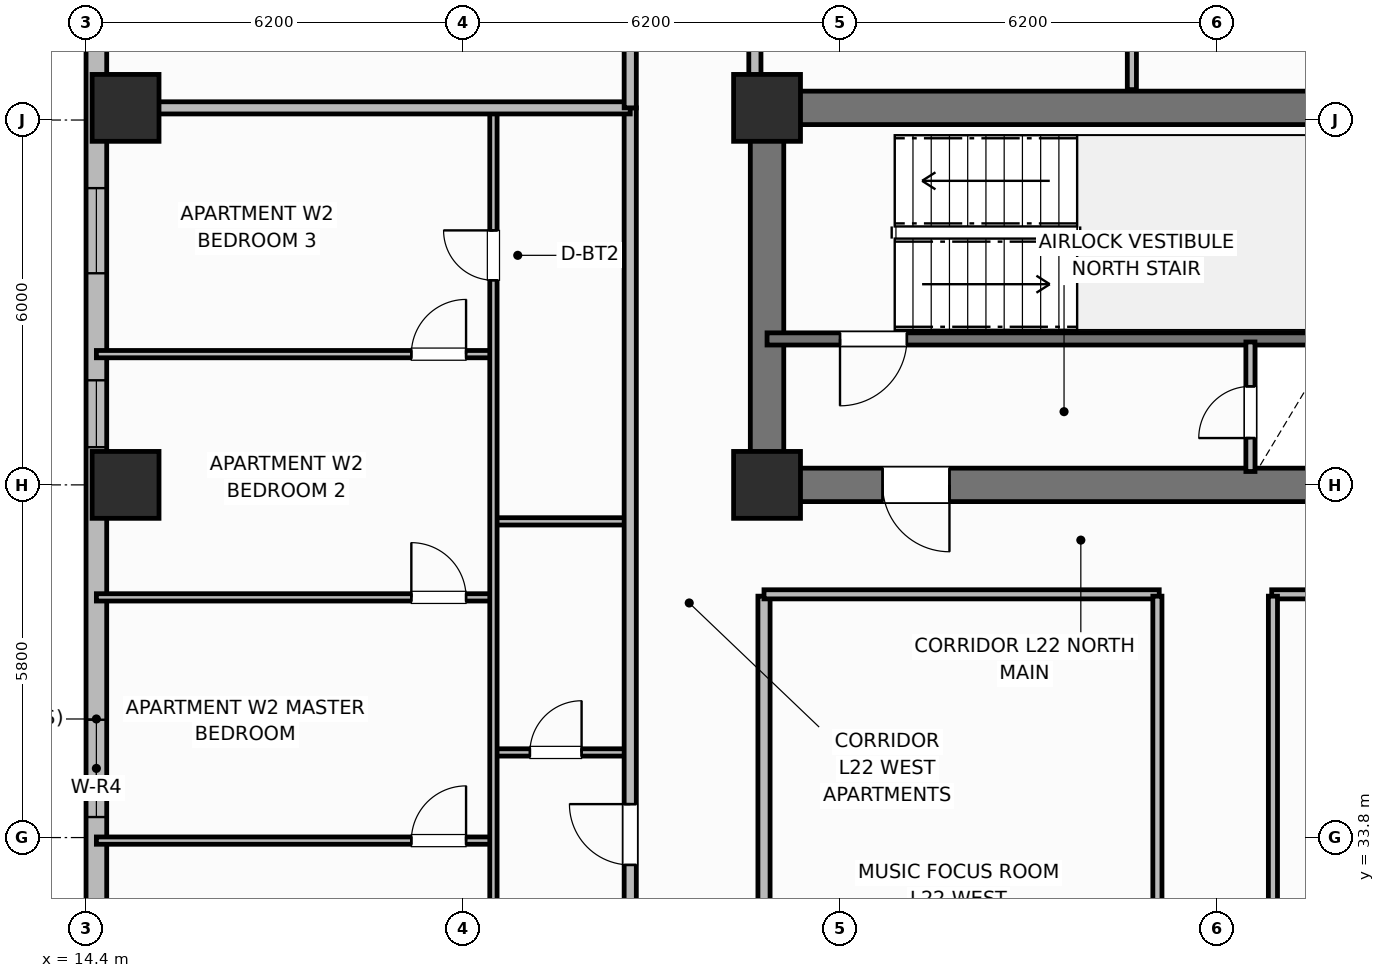
"""IFC4 building model, lengths in metres.
Left out: names, types, materials, properties, quantities, classifications, styles, units other than length and angle.
Written with IfcOpenShell. Run it as: python <this file> out.ifc"""

import sys

from ifc_helpers import new_model, si_unit, direction, frame, frame_2d, origin, origin_2d, place, context, subcontext, project, spatial, rectangle, extrude, element, fill, save


model = new_model("IFC4")
c1 = context("Model", 3, precision=1e-05, world=origin(), true_north=direction((0.0, 1.0)))
c2 = subcontext(c1, "Body", "Model", "MODEL_VIEW")
j1 = project(units=[si_unit("LENGTHUNIT", "METRE"), si_unit("PLANEANGLEUNIT", "RADIAN")], contexts=[c1])
p1 = place(None, origin())
s1 = spatial("IfcSite", under=j1, at=p1, CompositionType="ELEMENT")
p2 = place(p1, origin())
s2 = spatial("IfcBuilding", under=s1, at=p2, CompositionType="ELEMENT")
p3 = place(p2, frame((0.0, 0.0, 92.0)))
s3 = spatial("IfcBuildingStorey", under=s2, at=p3, CompositionType="ELEMENT", Elevation=92.0)
p4 = place(p3, frame((25.6, 45.8, 0.0), z_axis=(0.0, 0.0, 1.0), x_axis=(1.0, 0.0, 0.0)))
e1 = element("IfcWall", 1, at=p4, inside=s3, PredefinedType="SHEAR", context=c2, shape_type="SweptSolid", body=[
    extrude(rectangle(XDim=27.2, YDim=0.55, at=frame_2d((13.6, 0.0))), origin(), (0.0, 0.0, 1.0), 3.7),
])
p5 = place(p3, frame((25.6, 39.875, 0.0), z_axis=(0.0, 0.0, 1.0), x_axis=(0.0, 1.0, 0.0)))
e2 = element("IfcWall", 2, at=p5, inside=s3, PredefinedType="SHEAR", context=c2, shape_type="SweptSolid", body=[
    extrude(rectangle(XDim=5.65, YDim=0.55, at=frame_2d((2.825, 0.0))), origin(), (0.0, 0.0, 1.0), 3.7),
])
p6 = place(p3, frame((52.8, 39.6, 0.0), z_axis=(0.0, 0.0, 1.0), x_axis=(-1.0, 0.0, 0.0)))
e3 = element("IfcWall", 3, at=p6, inside=s3, PredefinedType="SHEAR", context=c2, shape_type="SweptSolid", body=[
    extrude(rectangle(XDim=27.2, YDim=0.55, at=frame_2d((13.6, 0.0))), origin(), (0.0, 0.0, 1.0), 3.7),
])
p7 = place(p6, frame((24.2, 0.0, 0.0)))
e4 = element("IfcOpeningElement", 4, at=p7, cuts=e3, PredefinedType="OPENING", context=c2, shape_type="SweptSolid", body=[
    extrude(rectangle(XDim=1.1, YDim=2.15, at=frame_2d((0.55, 1.075))), frame((0.0, 0.285, 0.0), z_axis=(0.0, -1.0, 0.0), x_axis=(1.0, 0.0, 0.0)), (0.0, 0.0, 1.0), 0.57),
])
p8 = place(p6, frame((15.1, 0.0, 0.0)))
e5 = element("IfcOpeningElement", 5, at=p8, cuts=e3, PredefinedType="OPENING", context=c2, shape_type="SweptSolid", body=[
    extrude(rectangle(XDim=1.2, YDim=2.15, at=frame_2d((0.6, 1.075))), frame((0.0, 0.285, 0.0), z_axis=(0.0, -1.0, 0.0), x_axis=(1.0, 0.0, 0.0)), (0.0, 0.0, 1.0), 0.57),
])
p9 = place(p6, frame((11.3, 0.0, 0.0)))
e6 = element("IfcOpeningElement", 6, at=p9, cuts=e3, PredefinedType="OPENING", context=c2, shape_type="SweptSolid", body=[
    extrude(rectangle(XDim=1.3, YDim=2.2, at=frame_2d((0.65, 1.1))), frame((0.0, 0.285, 0.0), z_axis=(0.0, -1.0, 0.0), x_axis=(1.0, 0.0, 0.0)), (0.0, 0.0, 1.0), 0.57),
])
p10 = place(p6, frame((7.25, 0.0, 0.0)))
e7 = element("IfcOpeningElement", 7, at=p10, cuts=e3, PredefinedType="OPENING", context=c2, shape_type="SweptSolid", body=[
    extrude(rectangle(XDim=0.85, YDim=2.1, at=frame_2d((0.425, 1.05))), frame((0.0, 0.285, 0.0), z_axis=(0.0, -1.0, 0.0), x_axis=(1.0, 0.0, 0.0)), (0.0, 0.0, 1.0), 0.57),
])
p11 = place(p6, frame((3.0, 0.0, 0.0)))
e8 = element("IfcOpeningElement", 8, at=p11, cuts=e3, PredefinedType="OPENING", context=c2, shape_type="SweptSolid", body=[
    extrude(rectangle(XDim=0.9, YDim=2.1, at=frame_2d((0.45, 1.05))), frame((0.0, 0.285, 0.0), z_axis=(0.0, -1.0, 0.0), x_axis=(1.0, 0.0, 0.0)), (0.0, 0.0, 1.0), 0.57),
])
for number, where, z_axis, x_axis in (
    (9, (25.6, 39.6, 0.0), (0.0, 0.0, 1.0), (1.0, 0.0, 0.0)),
    (10, (25.6, 45.8, 0.0), (0.0, 0.0, 1.0), (1.0, 0.0, 0.0)),
    (11, (15.05, 39.6, 0.0), (0.0, 0.0, 1.0), (1.0, 0.0, 0.0)),
    (12, (15.05, 45.8, 0.0), (0.0, 0.0, 1.0), (1.0, 0.0, 0.0)),
):
    element("IfcColumn", number, at=place(p3, frame(where, z_axis=z_axis, x_axis=x_axis)), inside=s3, PredefinedType="COLUMN", context=c2, shape_type="SweptSolid", body=[
        extrude(rectangle(XDim=1.1, YDim=1.1, at=origin_2d()), origin(), (0.0, 0.0, 1.0), 3.7),
    ])
p12 = place(p3, frame((14.57, 47.4, 0.0), z_axis=(0.0, 0.0, 1.0), x_axis=(0.0, -1.0, 0.0)))
e13 = element("IfcWall", 13, at=p12, inside=s3, PredefinedType="SOLIDWALL", context=c2, shape_type="SweptSolid", body=[
    extrude(rectangle(XDim=14.8, YDim=0.34, at=frame_2d((7.4, 0.0))), origin(), (0.0, 0.0, 1.0), 2.7),
])
p13 = place(p12, frame((2.92, 0.0, 0.69)))
e14 = element("IfcOpeningElement", 14, at=p13, cuts=e13, PredefinedType="OPENING", context=c2, shape_type="SweptSolid", body=[
    extrude(rectangle(XDim=1.4, YDim=1.85, at=frame_2d((0.7, 0.925))), frame((0.0, 0.18, 0.0), z_axis=(0.0, -1.0, 0.0), x_axis=(1.0, 0.0, 0.0)), (0.0, 0.0, 1.0), 0.36),
])
p14 = place(p12, frame((6.08, 0.0, 0.89)))
e15 = element("IfcOpeningElement", 15, at=p14, cuts=e13, PredefinedType="OPENING", context=c2, shape_type="SweptSolid", body=[
    extrude(rectangle(XDim=1.1, YDim=1.65, at=frame_2d((0.55, 0.825))), frame((0.0, 0.18, 0.0), z_axis=(0.0, -1.0, 0.0), x_axis=(1.0, 0.0, 0.0)), (0.0, 0.0, 1.0), 0.36),
])
p15 = place(p12, frame((11.663, 0.0, 0.68)))
e16 = element("IfcOpeningElement", 16, at=p15, cuts=e13, PredefinedType="OPENING", context=c2, shape_type="SweptSolid", body=[
    extrude(rectangle(XDim=1.6, YDim=1.9, at=frame_2d((0.8, 0.95))), frame((0.0, 0.18, 0.0), z_axis=(0.0, -1.0, 0.0), x_axis=(1.0, 0.0, 0.0)), (0.0, 0.0, 1.0), 0.36),
])
p16 = place(p3, frame((35.15, 42.0, 0.0), z_axis=(0.0, 0.0, 1.0), x_axis=(-1.0, 0.0, 0.0)))
e17 = element("IfcWall", 17, at=p16, inside=s3, PredefinedType="SHEAR", context=c2, shape_type="SweptSolid", body=[
    extrude(rectangle(XDim=9.55, YDim=0.2, at=frame_2d((4.775, 0.0))), origin(), (0.0, 0.0, 1.0), 3.7),
])
p17 = place(p16, frame((7.25, 0.0, 0.0)))
e18 = element("IfcOpeningElement", 18, at=p17, cuts=e17, PredefinedType="OPENING", context=c2, shape_type="SweptSolid", body=[
    extrude(rectangle(XDim=1.1, YDim=2.15, at=frame_2d((0.55, 1.075))), frame((0.0, 0.11, 0.0), z_axis=(0.0, -1.0, 0.0), x_axis=(1.0, 0.0, 0.0)), (0.0, 0.0, 1.0), 0.22),
])
p18 = place(p3, frame((33.55, 39.82, 0.0), z_axis=(0.0, 0.0, 1.0), x_axis=(0.0, 1.0, 0.0)))
e19 = element("IfcWall", 19, at=p18, inside=s3, PredefinedType="PARTITIONING", context=c2, shape_type="SweptSolid", body=[
    extrude(rectangle(XDim=2.13, YDim=0.15, at=frame_2d((1.065, 0.0))), origin(), (0.0, 0.0, 1.0), 2.53),
])
p19 = place(p18, frame((0.55, 0.0, 0.0)))
e20 = element("IfcOpeningElement", 20, at=p19, cuts=e19, PredefinedType="OPENING", context=c2, shape_type="SweptSolid", body=[
    extrude(rectangle(XDim=0.85, YDim=2.05, at=frame_2d((0.425, 1.025))), frame((0.0, 0.085, 0.0), z_axis=(0.0, -1.0, 0.0), x_axis=(1.0, 0.0, 0.0)), (0.0, 0.0, 1.0), 0.17),
])
p20 = place(p3, frame((25.55, 18.63, 0.0), z_axis=(0.0, 0.0, 1.0), x_axis=(0.0, 1.0, 0.0)))
e21 = element("IfcWall", 21, at=p20, inside=s3, PredefinedType="PARTITIONING", context=c2, shape_type="SweptSolid", body=[
    extrude(rectangle(XDim=19.14, YDim=0.2, at=frame_2d((9.57, 0.0))), origin(), (0.0, 0.0, 1.0), 2.53),
])
p21 = place(p3, frame((25.55, 37.8, 0.0), z_axis=(0.0, 0.0, 1.0), x_axis=(1.0, 0.0, 0.0)))
e22 = element("IfcWall", 22, at=p21, inside=s3, PredefinedType="PARTITIONING", context=c2, shape_type="SweptSolid", body=[
    extrude(rectangle(XDim=6.5, YDim=0.15, at=frame_2d((3.25, 0.0))), origin(), (0.0, 0.0, 1.0), 2.53),
])
p22 = place(p3, frame((33.9, 37.8, 0.0), z_axis=(0.0, 0.0, 1.0), x_axis=(1.0, 0.0, 0.0)))
e23 = element("IfcWall", 23, at=p22, inside=s3, PredefinedType="PARTITIONING", context=c2, shape_type="SweptSolid", body=[
    extrude(rectangle(XDim=10.6, YDim=0.15, at=frame_2d((5.3, 0.0))), origin(), (0.0, 0.0, 1.0), 2.53),
])
p23 = place(p3, frame((32.02, 18.63, 0.0), z_axis=(0.0, 0.0, 1.0), x_axis=(0.0, 1.0, 0.0)))
e24 = element("IfcWall", 24, at=p23, inside=s3, PredefinedType="PARTITIONING", context=c2, shape_type="SweptSolid", body=[
    extrude(rectangle(XDim=19.14, YDim=0.15, at=frame_2d((9.57, 0.0))), origin(), (0.0, 0.0, 1.0), 2.53),
])
p24 = place(p23, frame((3.0, 0.0, 0.0)))
e25 = element("IfcOpeningElement", 25, at=p24, cuts=e24, PredefinedType="OPENING", context=c2, shape_type="SweptSolid", body=[
    extrude(rectangle(XDim=0.9, YDim=2.1, at=frame_2d((0.45, 1.05))), frame((0.0, 0.085, 0.0), z_axis=(0.0, -1.0, 0.0), x_axis=(1.0, 0.0, 0.0)), (0.0, 0.0, 1.0), 0.17),
])
p25 = place(p23, frame((11.5, 0.0, 0.0)))
e26 = element("IfcOpeningElement", 26, at=p25, cuts=e24, PredefinedType="OPENING", context=c2, shape_type="SweptSolid", body=[
    extrude(rectangle(XDim=0.9, YDim=2.1, at=frame_2d((0.45, 1.05))), frame((0.0, 0.085, 0.0), z_axis=(0.0, -1.0, 0.0), x_axis=(1.0, 0.0, 0.0)), (0.0, 0.0, 1.0), 0.17),
])
p26 = place(p3, frame((33.92, 18.63, 0.0), z_axis=(0.0, 0.0, 1.0), x_axis=(0.0, 1.0, 0.0)))
e27 = element("IfcWall", 27, at=p26, inside=s3, PredefinedType="PARTITIONING", context=c2, shape_type="SweptSolid", body=[
    extrude(rectangle(XDim=19.14, YDim=0.15, at=frame_2d((9.57, 0.0))), origin(), (0.0, 0.0, 1.0), 2.53),
])
p27 = place(p26, frame((2.4, 0.0, 0.0)))
e28 = element("IfcOpeningElement", 28, at=p27, cuts=e27, PredefinedType="OPENING", context=c2, shape_type="SweptSolid", body=[
    extrude(rectangle(XDim=0.9, YDim=2.1, at=frame_2d((0.45, 1.05))), frame((0.0, 0.085, 0.0), z_axis=(0.0, -1.0, 0.0), x_axis=(1.0, 0.0, 0.0)), (0.0, 0.0, 1.0), 0.17),
])
p28 = place(p3, frame((21.1, 35.2, 0.0), z_axis=(0.0, 0.0, 1.0), x_axis=(1.0, 0.0, 0.0)))
e29 = element("IfcWall", 29, at=p28, inside=s3, PredefinedType="PARTITIONING", context=c2, shape_type="SweptSolid", body=[
    extrude(rectangle(XDim=2.25, YDim=0.12, at=frame_2d((1.125, 0.0))), origin(), (0.0, 0.0, 1.0), 2.53),
])
p29 = place(p28, frame((0.6, 0.0, 0.0)))
e30 = element("IfcOpeningElement", 30, at=p29, cuts=e29, PredefinedType="OPENING", context=c2, shape_type="SweptSolid", body=[
    extrude(rectangle(XDim=0.85, YDim=2.1, at=frame_2d((0.425, 1.05))), frame((0.0, 0.07, 0.0), z_axis=(0.0, -1.0, 0.0), x_axis=(1.0, 0.0, 0.0)), (0.0, 0.0, 1.0), 0.14),
])
p30 = place(p3, frame((21.1, 39.0, 0.0), z_axis=(0.0, 0.0, 1.0), x_axis=(1.0, 0.0, 0.0)))
e31 = element("IfcWall", 31, at=p30, inside=s3, PredefinedType="PARTITIONING", context=c2, shape_type="SweptSolid", body=[
    extrude(rectangle(XDim=2.25, YDim=0.12, at=frame_2d((1.125, 0.0))), origin(), (0.0, 0.0, 1.0), 2.53),
])
p31 = place(p3, frame((14.57, 33.75, 0.0), z_axis=(0.0, 0.0, 1.0), x_axis=(1.0, 0.0, 0.0)))
e32 = element("IfcWall", 32, at=p31, inside=s3, PredefinedType="PARTITIONING", context=c2, shape_type="SweptSolid", body=[
    extrude(rectangle(XDim=6.53, YDim=0.12, at=frame_2d((3.265, 0.0))), origin(), (0.0, 0.0, 1.0), 2.53),
])
p32 = place(p31, frame((5.18, 0.0, 0.0)))
e33 = element("IfcOpeningElement", 33, at=p32, cuts=e32, PredefinedType="OPENING", context=c2, shape_type="SweptSolid", body=[
    extrude(rectangle(XDim=0.9, YDim=2.1, at=frame_2d((0.45, 1.05))), frame((0.0, 0.07, 0.0), z_axis=(0.0, -1.0, 0.0), x_axis=(1.0, 0.0, 0.0)), (0.0, 0.0, 1.0), 0.14),
])
p33 = place(p3, frame((14.57, 37.75, 0.0), z_axis=(0.0, 0.0, 1.0), x_axis=(1.0, 0.0, 0.0)))
e34 = element("IfcWall", 34, at=p33, inside=s3, PredefinedType="PARTITIONING", context=c2, shape_type="SweptSolid", body=[
    extrude(rectangle(XDim=6.53, YDim=0.12, at=frame_2d((3.265, 0.0))), origin(), (0.0, 0.0, 1.0), 2.53),
])
p34 = place(p33, frame((5.18, 0.0, 0.0)))
e35 = element("IfcOpeningElement", 35, at=p34, cuts=e34, PredefinedType="OPENING", context=c2, shape_type="SweptSolid", body=[
    extrude(rectangle(XDim=0.9, YDim=2.1, at=frame_2d((0.45, 1.05))), frame((0.0, 0.07, 0.0), z_axis=(0.0, -1.0, 0.0), x_axis=(1.0, 0.0, 0.0)), (0.0, 0.0, 1.0), 0.14),
])
p35 = place(p3, frame((14.57, 41.75, 0.0), z_axis=(0.0, 0.0, 1.0), x_axis=(1.0, 0.0, 0.0)))
e36 = element("IfcWall", 36, at=p35, inside=s3, PredefinedType="PARTITIONING", context=c2, shape_type="SweptSolid", body=[
    extrude(rectangle(XDim=6.53, YDim=0.12, at=frame_2d((3.265, 0.0))), origin(), (0.0, 0.0, 1.0), 2.53),
])
p36 = place(p35, frame((5.18, 0.0, 0.0)))
e37 = element("IfcOpeningElement", 37, at=p36, cuts=e36, PredefinedType="OPENING", context=c2, shape_type="SweptSolid", body=[
    extrude(rectangle(XDim=0.9, YDim=2.1, at=frame_2d((0.45, 1.05))), frame((0.0, 0.07, 0.0), z_axis=(0.0, -1.0, 0.0), x_axis=(1.0, 0.0, 0.0)), (0.0, 0.0, 1.0), 0.14),
])
p37 = place(p3, frame((21.1, 29.84, 0.0), z_axis=(0.0, 0.0, 1.0), x_axis=(0.0, 1.0, 0.0)))
e38 = element("IfcWall", 38, at=p37, inside=s3, PredefinedType="PARTITIONING", context=c2, shape_type="SweptSolid", body=[
    extrude(rectangle(XDim=15.92, YDim=0.12, at=frame_2d((7.96, 0.0))), origin(), (0.0, 0.0, 1.0), 2.53),
])
p38 = place(p37, frame((0.41, 0.0, 0.0)))
e39 = element("IfcOpeningElement", 39, at=p38, cuts=e38, PredefinedType="OPENING", context=c2, shape_type="SweptSolid", body=[
    extrude(rectangle(XDim=0.9, YDim=2.1, at=frame_2d((0.45, 1.05))), frame((0.0, 0.07, 0.0), z_axis=(0.0, -1.0, 0.0), x_axis=(1.0, 0.0, 0.0)), (0.0, 0.0, 1.0), 0.14),
])
p39 = place(p37, frame((13.125, 0.0, 0.0)))
e40 = element("IfcOpeningElement", 40, at=p39, cuts=e38, PredefinedType="OPENING", context=c2, shape_type="SweptSolid", body=[
    extrude(rectangle(XDim=0.82, YDim=2.08, at=frame_2d((0.41, 1.04))), frame((0.0, 0.07, 0.0), z_axis=(0.0, -1.0, 0.0), x_axis=(1.0, 0.0, 0.0)), (0.0, 0.0, 1.0), 0.14),
])
p40 = place(p3, frame((23.35, 10.6, 0.0), z_axis=(0.0, 0.0, 1.0), x_axis=(0.0, 1.0, 0.0)))
e41 = element("IfcWall", 41, at=p40, inside=s3, PredefinedType="PARTITIONING", context=c2, shape_type="SweptSolid", body=[
    extrude(rectangle(XDim=35.2, YDim=0.2, at=frame_2d((17.6, 0.0))), origin(), (0.0, 0.0, 1.0), 2.53),
])
p41 = place(p40, frame((2.65, 0.0, 0.0)))
e42 = element("IfcOpeningElement", 42, at=p41, cuts=e41, PredefinedType="OPENING", context=c2, shape_type="SweptSolid", body=[
    extrude(rectangle(XDim=1.0, YDim=2.15, at=frame_2d((0.5, 1.075))), frame((0.0, 0.11, 0.0), z_axis=(0.0, -1.0, 0.0), x_axis=(1.0, 0.0, 0.0)), (0.0, 0.0, 1.0), 0.22),
])
p42 = place(p40, frame((22.75, 0.0, 0.0)))
e43 = element("IfcOpeningElement", 43, at=p42, cuts=e41, PredefinedType="OPENING", context=c2, shape_type="SweptSolid", body=[
    extrude(rectangle(XDim=1.0, YDim=2.15, at=frame_2d((0.5, 1.075))), frame((0.0, 0.11, 0.0), z_axis=(0.0, -1.0, 0.0), x_axis=(1.0, 0.0, 0.0)), (0.0, 0.0, 1.0), 0.22),
])
p43 = place(p3, frame((14.99, 45.8, 0.0), z_axis=(0.0, 0.0, 1.0), x_axis=(1.0, 0.0, 0.0)))
e44 = element("IfcWall", 44, at=p43, inside=s3, PredefinedType="PARTITIONING", context=c2, shape_type="SweptSolid", body=[
    extrude(rectangle(XDim=8.36, YDim=0.2, at=frame_2d((4.18, 0.0))), origin(), (0.0, 0.0, 1.0), 2.53),
])
p44 = place(p3, frame((23.35, 45.8, 0.0), z_axis=(0.0, 0.0, 1.0), x_axis=(0.0, 1.0, 0.0)))
e45 = element("IfcWall", 45, at=p44, inside=s3, PredefinedType="PARTITIONING", context=c2, shape_type="SweptSolid", body=[
    extrude(rectangle(XDim=5.63, YDim=0.2, at=frame_2d((2.815, 0.0))), origin(), (0.0, 0.0, 1.0), 2.53),
])
p45 = place(p3, frame((31.6, 46.1, 0.0), z_axis=(0.0, 0.0, 1.0), x_axis=(0.0, 1.0, 0.0)))
e46 = element("IfcWall", 46, at=p45, inside=s3, PredefinedType="PARTITIONING", context=c2, shape_type="SweptSolid", body=[
    extrude(rectangle(XDim=5.33, YDim=0.15, at=frame_2d((2.665, 0.0))), origin(), (0.0, 0.0, 1.0), 2.53),
])
p46 = place(p45, frame((0.85, 0.0, 0.0)))
e47 = element("IfcOpeningElement", 47, at=p46, cuts=e46, PredefinedType="OPENING", context=c2, shape_type="SweptSolid", body=[
    extrude(rectangle(XDim=0.9, YDim=2.1, at=frame_2d((0.45, 1.05))), frame((0.0, 0.085, 0.0), z_axis=(0.0, -1.0, 0.0), x_axis=(1.0, 0.0, 0.0)), (0.0, 0.0, 1.0), 0.17),
])
p47 = place(p3, frame((25.4, 46.1, 0.0), z_axis=(0.0, 0.0, 1.0), x_axis=(0.0, 1.0, 0.0)))
e48 = element("IfcWall", 48, at=p47, inside=s3, PredefinedType="PARTITIONING", context=c2, shape_type="SweptSolid", body=[
    extrude(rectangle(XDim=4.68, YDim=0.2, at=frame_2d((2.34, 0.0))), origin(), (0.0, 0.0, 1.0), 2.53),
])
p48 = place(p47, frame((1.05, 0.0, 0.0)))
e49 = element("IfcOpeningElement", 49, at=p48, cuts=e48, PredefinedType="OPENING", context=c2, shape_type="SweptSolid", body=[
    extrude(rectangle(XDim=0.9, YDim=2.1, at=frame_2d((0.45, 1.05))), frame((0.0, 0.11, 0.0), z_axis=(0.0, -1.0, 0.0), x_axis=(1.0, 0.0, 0.0)), (0.0, 0.0, 1.0), 0.22),
])
p49 = place(p13, origin())
e50 = element("IfcWindow", 50, at=p49, inside=s3, PartitioningType="SINGLE_PANEL", PredefinedType="WINDOW", context=c2, shape_type="SweptSolid", body=[
    extrude(rectangle(XDim=1.4, YDim=1.85, at=frame_2d((0.7, 0.925))), frame((0.0, 0.03, 0.0), z_axis=(0.0, -1.0, 0.0), x_axis=(1.0, 0.0, 0.0)), (0.0, 0.0, 1.0), 0.06),
])
fill(e14, e50)
p50 = place(p14, origin())
e51 = element("IfcWindow", 51, at=p50, inside=s3, PartitioningType="SINGLE_PANEL", PredefinedType="WINDOW", context=c2, shape_type="SweptSolid", body=[
    extrude(rectangle(XDim=1.1, YDim=1.65, at=frame_2d((0.55, 0.825))), frame((0.0, 0.03, 0.0), z_axis=(0.0, -1.0, 0.0), x_axis=(1.0, 0.0, 0.0)), (0.0, 0.0, 1.0), 0.06),
])
fill(e15, e51)
p51 = place(p15, origin())
e52 = element("IfcWindow", 52, at=p51, inside=s3, PartitioningType="SINGLE_PANEL", PredefinedType="WINDOW", context=c2, shape_type="SweptSolid", body=[
    extrude(rectangle(XDim=1.6, YDim=1.9, at=frame_2d((0.8, 0.95))), frame((0.0, 0.03, 0.0), z_axis=(0.0, -1.0, 0.0), x_axis=(1.0, 0.0, 0.0)), (0.0, 0.0, 1.0), 0.06),
])
fill(e16, e52)
p52 = place(p17, origin())
e53 = element("IfcDoor", 53, at=p52, inside=s3, OperationType="SINGLE_SWING_RIGHT", PredefinedType="DOOR", context=c2, shape_type="SweptSolid", body=[
    extrude(rectangle(XDim=1.1, YDim=2.15, at=frame_2d((0.55, 1.075))), frame((0.0, 0.025, 0.0), z_axis=(0.0, -1.0, 0.0), x_axis=(1.0, 0.0, 0.0)), (0.0, 0.0, 1.0), 0.05),
])
fill(e18, e53)
p53 = place(p19, origin())
e54 = element("IfcDoor", 54, at=p53, inside=s3, OperationType="SINGLE_SWING_LEFT", PredefinedType="TRAPDOOR", context=c2, shape_type="SweptSolid", body=[
    extrude(rectangle(XDim=0.85, YDim=2.05, at=frame_2d((0.425, 1.025))), frame((0.0, 0.025, 0.0), z_axis=(0.0, -1.0, 0.0), x_axis=(1.0, 0.0, 0.0)), (0.0, 0.0, 1.0), 0.05),
])
fill(e20, e54)
p54 = place(p29, origin())
e55 = element("IfcDoor", 55, at=p54, inside=s3, OperationType="SINGLE_SWING_RIGHT", PredefinedType="DOOR", context=c2, shape_type="SweptSolid", body=[
    extrude(rectangle(XDim=0.85, YDim=2.1, at=frame_2d((0.425, 1.05))), frame((0.0, 0.025, 0.0), z_axis=(0.0, -1.0, 0.0), x_axis=(1.0, 0.0, 0.0)), (0.0, 0.0, 1.0), 0.05),
])
fill(e30, e55)
p55 = place(p32, origin())
e56 = element("IfcDoor", 56, at=p55, inside=s3, OperationType="SINGLE_SWING_RIGHT", PredefinedType="DOOR", context=c2, shape_type="SweptSolid", body=[
    extrude(rectangle(XDim=0.9, YDim=2.1, at=frame_2d((0.45, 1.05))), frame((0.0, 0.025, 0.0), z_axis=(0.0, -1.0, 0.0), x_axis=(1.0, 0.0, 0.0)), (0.0, 0.0, 1.0), 0.05),
])
fill(e33, e56)
p56 = place(p34, origin())
e57 = element("IfcDoor", 57, at=p56, inside=s3, OperationType="SINGLE_SWING_LEFT", PredefinedType="DOOR", context=c2, shape_type="SweptSolid", body=[
    extrude(rectangle(XDim=0.9, YDim=2.1, at=frame_2d((0.45, 1.05))), frame((0.0, 0.025, 0.0), z_axis=(0.0, -1.0, 0.0), x_axis=(1.0, 0.0, 0.0)), (0.0, 0.0, 1.0), 0.05),
])
fill(e35, e57)
p57 = place(p36, origin())
e58 = element("IfcDoor", 58, at=p57, inside=s3, OperationType="SINGLE_SWING_RIGHT", PredefinedType="DOOR", context=c2, shape_type="SweptSolid", body=[
    extrude(rectangle(XDim=0.9, YDim=2.1, at=frame_2d((0.45, 1.05))), frame((0.0, 0.025, 0.0), z_axis=(0.0, -1.0, 0.0), x_axis=(1.0, 0.0, 0.0)), (0.0, 0.0, 1.0), 0.05),
])
fill(e37, e58)
p58 = place(p39, origin())
e59 = element("IfcDoor", 59, at=p58, inside=s3, OperationType="SINGLE_SWING_RIGHT", PredefinedType="DOOR", context=c2, shape_type="SweptSolid", body=[
    extrude(rectangle(XDim=0.82, YDim=2.08, at=frame_2d((0.41, 1.04))), frame((0.0, 0.025, 0.0), z_axis=(0.0, -1.0, 0.0), x_axis=(1.0, 0.0, 0.0)), (0.0, 0.0, 1.0), 0.05),
])
fill(e40, e59)
p59 = place(p42, origin())
e60 = element("IfcDoor", 60, at=p59, inside=s3, OperationType="SINGLE_SWING_RIGHT", PredefinedType="DOOR", context=c2, shape_type="SweptSolid", body=[
    extrude(rectangle(XDim=1.0, YDim=2.15, at=frame_2d((0.5, 1.075))), frame((0.0, 0.025, 0.0), z_axis=(0.0, -1.0, 0.0), x_axis=(1.0, 0.0, 0.0)), (0.0, 0.0, 1.0), 0.05),
])
fill(e43, e60)
p60 = place(p7, origin())
e61 = element("IfcDoor", 61, at=p60, inside=s3, OperationType="SINGLE_SWING_LEFT", PredefinedType="DOOR", context=c2, shape_type="SweptSolid", body=[
    extrude(rectangle(XDim=1.1, YDim=2.15, at=frame_2d((0.55, 1.075))), frame((0.0, 0.025, 0.0), z_axis=(0.0, -1.0, 0.0), x_axis=(1.0, 0.0, 0.0)), (0.0, 0.0, 1.0), 0.05),
])
fill(e4, e61)
save(model, sys.argv[1])
